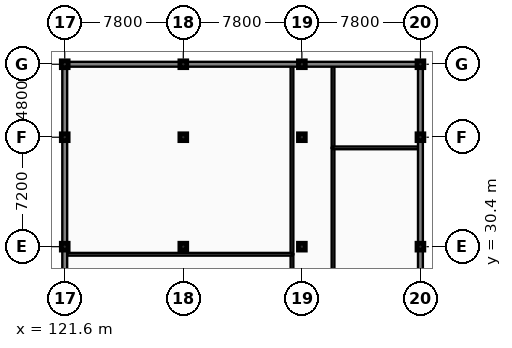
"""IFC4 building model, lengths in metres.
Left out: names, types, materials, properties, quantities, classifications, styles, units other than length and angle.
Written with IfcOpenShell. Run it as: python <this file> out.ifc"""

import sys

from ifc_helpers import new_model, si_unit, direction, frame, frame_2d, origin, origin_2d, place, context, subcontext, project, spatial, rectangle, extrude, element, fill, save


model = new_model("IFC4")
c1 = context("Model", 3, precision=1e-05, world=origin(), true_north=direction((0.0, 1.0)))
c2 = subcontext(c1, "Body", "Model", "MODEL_VIEW")
j1 = project(units=[si_unit("LENGTHUNIT", "METRE"), si_unit("PLANEANGLEUNIT", "RADIAN")], contexts=[c1])
p1 = place(None, origin())
s1 = spatial("IfcSite", under=j1, at=p1, CompositionType="ELEMENT")
p2 = place(p1, origin())
s2 = spatial("IfcBuilding", under=s1, at=p2, CompositionType="ELEMENT")
p3 = place(p2, origin())
s3 = spatial("IfcBuildingStorey", under=s2, at=p3, CompositionType="ELEMENT", Elevation=0.0)
for number, where, z_axis, x_axis in (
    (1, (121.6, 30.4, 0.0), (0.0, 0.0, 1.0), (1.0, 0.0, 0.0)),
    (2, (121.6, 37.6, 0.0), (0.0, 0.0, 1.0), (1.0, 0.0, 0.0)),
    (3, (121.6, 42.4, 0.0), (0.0, 0.0, 1.0), (1.0, 0.0, 0.0)),
    (4, (129.4, 30.4, 0.0), (0.0, 0.0, 1.0), (1.0, 0.0, 0.0)),
    (5, (129.4, 37.6, 0.0), (0.0, 0.0, 1.0), (1.0, 0.0, 0.0)),
    (6, (129.4, 42.4, 0.0), (0.0, 0.0, 1.0), (1.0, 0.0, 0.0)),
    (7, (137.2, 30.4, 0.0), (0.0, 0.0, 1.0), (1.0, 0.0, 0.0)),
    (8, (137.2, 37.6, 0.0), (0.0, 0.0, 1.0), (1.0, 0.0, 0.0)),
    (9, (137.2, 42.4, 0.0), (0.0, 0.0, 1.0), (1.0, 0.0, 0.0)),
    (10, (145.0, 30.4, 0.0), (0.0, 0.0, 1.0), (1.0, 0.0, 0.0)),
    (11, (145.0, 37.6, 0.0), (0.0, 0.0, 1.0), (1.0, 0.0, 0.0)),
    (12, (145.0, 42.4, 0.0), (0.0, 0.0, 1.0), (1.0, 0.0, 0.0)),
):
    element("IfcColumn", number, at=place(p3, frame(where, z_axis=z_axis, x_axis=x_axis)), inside=s3, PredefinedType="COLUMN", context=c2, shape_type="SweptSolid", body=[
        extrude(rectangle(XDim=0.45, YDim=0.45, at=origin_2d()), origin(), (0.0, 0.0, 1.0), 5.4),
    ])
p4 = place(p3, frame((136.55, 16.65, 0.0), z_axis=(0.0, 0.0, 1.0), x_axis=(0.0, 1.0, 0.0)))
e13 = element("IfcWall", 13, at=p4, inside=s3, PredefinedType="PARTITIONING", context=c2, shape_type="SweptSolid", body=[
    extrude(rectangle(XDim=13.25, YDim=0.18, at=frame_2d((6.625, 0.0))), origin(), (0.0, 0.0, 1.0), 4.64),
])
p5 = place(p4, frame((3.92, 0.0, -0.01)))
e14 = element("IfcOpeningElement", 14, at=p5, cuts=e13, PredefinedType="OPENING", context=c2, shape_type="SweptSolid", body=[
    extrude(rectangle(XDim=1.0, YDim=2.16, at=frame_2d((0.5, 1.08))), frame((0.0, 0.1, 0.0), z_axis=(0.0, -1.0, 0.0), x_axis=(1.0, 0.0, 0.0)), (0.0, 0.0, 1.0), 0.2),
])
p6 = place(p3, frame((136.55, 29.9, 0.0), z_axis=(0.0, 0.0, 1.0), x_axis=(0.0, 1.0, 0.0)))
e15 = element("IfcWall", 15, at=p6, inside=s3, PredefinedType="PARTITIONING", context=c2, shape_type="SweptSolid", body=[
    extrude(rectangle(XDim=12.35, YDim=0.18, at=frame_2d((6.175, 0.0))), origin(), (0.0, 0.0, 1.0), 4.54),
])
p7 = place(p6, frame((5.675, 0.0, -0.01)))
e16 = element("IfcOpeningElement", 16, at=p7, cuts=e15, PredefinedType="OPENING", context=c2, shape_type="SweptSolid", body=[
    extrude(rectangle(XDim=1.0, YDim=2.16, at=frame_2d((0.5, 1.08))), frame((0.0, 0.1, 0.0), z_axis=(0.0, -1.0, 0.0), x_axis=(1.0, 0.0, 0.0)), (0.0, 0.0, 1.0), 0.2),
])
p8 = place(p3, frame((121.75, 29.9, 0.0), z_axis=(0.0, 0.0, 1.0), x_axis=(1.0, 0.0, 0.0)))
e17 = element("IfcWall", 17, at=p8, inside=s3, PredefinedType="PARTITIONING", context=c2, shape_type="SweptSolid", body=[
    extrude(rectangle(XDim=14.8, YDim=0.18, at=frame_2d((7.4, 0.0))), origin(), (0.0, 0.0, 1.0), 4.64),
])
p9 = place(p3, frame((139.25, 23.1, 0.0), z_axis=(0.0, 0.0, 1.0), x_axis=(0.0, 1.0, 0.0)))
e18 = element("IfcWall", 18, at=p9, inside=s3, PredefinedType="PARTITIONING", context=c2, shape_type="SweptSolid", body=[
    extrude(rectangle(XDim=13.8, YDim=0.18, at=frame_2d((6.9, 0.0))), origin(), (0.0, 0.0, 1.0), 4.54),
])
p10 = place(p9, frame((6.4, 0.0, -0.01)))
e19 = element("IfcOpeningElement", 19, at=p10, cuts=e18, PredefinedType="OPENING", context=c2, shape_type="SweptSolid", body=[
    extrude(rectangle(XDim=1.0, YDim=2.16, at=frame_2d((0.5, 1.08))), frame((0.0, 0.1, 0.0), z_axis=(0.0, -1.0, 0.0), x_axis=(1.0, 0.0, 0.0)), (0.0, 0.0, 1.0), 0.2),
])
p11 = place(p3, frame((139.25, 36.9, 0.0), z_axis=(0.0, 0.0, 1.0), x_axis=(0.0, 1.0, 0.0)))
e20 = element("IfcWall", 20, at=p11, inside=s3, PredefinedType="PARTITIONING", context=c2, shape_type="SweptSolid", body=[
    extrude(rectangle(XDim=5.35, YDim=0.18, at=frame_2d((2.675, 0.0))), origin(), (0.0, 0.0, 1.0), 4.54),
])
p12 = place(p11, frame((2.175, 0.0, -0.01)))
e21 = element("IfcOpeningElement", 21, at=p12, cuts=e20, PredefinedType="OPENING", context=c2, shape_type="SweptSolid", body=[
    extrude(rectangle(XDim=1.0, YDim=2.16, at=frame_2d((0.5, 1.08))), frame((0.0, 0.1, 0.0), z_axis=(0.0, -1.0, 0.0), x_axis=(1.0, 0.0, 0.0)), (0.0, 0.0, 1.0), 0.2),
])
p13 = place(p3, frame((139.25, 36.9, 0.0), z_axis=(0.0, 0.0, 1.0), x_axis=(1.0, 0.0, 0.0)))
e22 = element("IfcWall", 22, at=p13, inside=s3, PredefinedType="PARTITIONING", context=c2, shape_type="SweptSolid", body=[
    extrude(rectangle(XDim=5.6, YDim=0.18, at=frame_2d((2.8, 0.0))), origin(), (0.0, 0.0, 1.0), 4.64),
])
p14 = place(p3, frame((129.4, 42.4, 0.0), z_axis=(0.0, 0.0, 1.0), x_axis=(-1.0, 0.0, 0.0)))
e23 = element("IfcWall", 23, at=p14, inside=s3, PredefinedType="SOLIDWALL", context=c2, shape_type="SweptSolid", body=[
    extrude(rectangle(XDim=7.8, YDim=0.32, at=frame_2d((3.9, 0.0))), origin(), (0.0, 0.0, 1.0), 4.64),
])
p15 = place(p14, frame((0.46, 0.0, 0.9)))
e24 = element("IfcOpeningElement", 24, at=p15, cuts=e23, PredefinedType="OPENING", context=c2, shape_type="SweptSolid", body=[
    extrude(rectangle(XDim=2.4, YDim=2.35, at=frame_2d((1.2, 1.175))), frame((0.0, 0.17, 0.0), z_axis=(0.0, -1.0, 0.0), x_axis=(1.0, 0.0, 0.0)), (0.0, 0.0, 1.0), 0.34),
])
p16 = place(p14, frame((4.86, 0.0, 0.9)))
e25 = element("IfcOpeningElement", 25, at=p16, cuts=e23, PredefinedType="OPENING", context=c2, shape_type="SweptSolid", body=[
    extrude(rectangle(XDim=2.4, YDim=2.35, at=frame_2d((1.2, 1.175))), frame((0.0, 0.17, 0.0), z_axis=(0.0, -1.0, 0.0), x_axis=(1.0, 0.0, 0.0)), (0.0, 0.0, 1.0), 0.34),
])
p17 = place(p3, frame((137.2, 42.4, 0.0), z_axis=(0.0, 0.0, 1.0), x_axis=(-1.0, 0.0, 0.0)))
e26 = element("IfcWall", 26, at=p17, inside=s3, PredefinedType="SOLIDWALL", context=c2, shape_type="SweptSolid", body=[
    extrude(rectangle(XDim=7.8, YDim=0.32, at=frame_2d((3.9, 0.0))), origin(), (0.0, 0.0, 1.0), 4.64),
])
p18 = place(p17, frame((0.86, 0.0, 0.9)))
e27 = element("IfcOpeningElement", 27, at=p18, cuts=e26, PredefinedType="OPENING", context=c2, shape_type="SweptSolid", body=[
    extrude(rectangle(XDim=2.4, YDim=2.35, at=frame_2d((1.2, 1.175))), frame((0.0, 0.17, 0.0), z_axis=(0.0, -1.0, 0.0), x_axis=(1.0, 0.0, 0.0)), (0.0, 0.0, 1.0), 0.34),
])
p19 = place(p17, frame((4.86, 0.0, 0.9)))
e28 = element("IfcOpeningElement", 28, at=p19, cuts=e26, PredefinedType="OPENING", context=c2, shape_type="SweptSolid", body=[
    extrude(rectangle(XDim=2.4, YDim=2.35, at=frame_2d((1.2, 1.175))), frame((0.0, 0.17, 0.0), z_axis=(0.0, -1.0, 0.0), x_axis=(1.0, 0.0, 0.0)), (0.0, 0.0, 1.0), 0.34),
])
p20 = place(p3, frame((145.0, 42.4, 0.0), z_axis=(0.0, 0.0, 1.0), x_axis=(-1.0, 0.0, 0.0)))
e29 = element("IfcWall", 29, at=p20, inside=s3, PredefinedType="SOLIDWALL", context=c2, shape_type="SweptSolid", body=[
    extrude(rectangle(XDim=7.8, YDim=0.32, at=frame_2d((3.9, 0.0))), origin(), (0.0, 0.0, 1.0), 4.64),
])
p21 = place(p20, frame((1.86, 0.0, 0.9)))
e30 = element("IfcOpeningElement", 30, at=p21, cuts=e29, PredefinedType="OPENING", context=c2, shape_type="SweptSolid", body=[
    extrude(rectangle(XDim=2.4, YDim=2.35, at=frame_2d((1.2, 1.175))), frame((0.0, 0.17, 0.0), z_axis=(0.0, -1.0, 0.0), x_axis=(1.0, 0.0, 0.0)), (0.0, 0.0, 1.0), 0.34),
])
p22 = place(p3, frame((121.6, 30.4, 0.0), z_axis=(0.0, 0.0, 1.0), x_axis=(0.0, -1.0, 0.0)))
e31 = element("IfcWall", 31, at=p22, inside=s3, PredefinedType="SOLIDWALL", context=c2, shape_type="SweptSolid", body=[
    extrude(rectangle(XDim=7.2, YDim=0.32, at=frame_2d((3.6, 0.0))), origin(), (0.0, 0.0, 1.0), 3.99),
])
p23 = place(p22, frame((2.6, 0.0, -0.01)))
e32 = element("IfcOpeningElement", 32, at=p23, cuts=e31, PredefinedType="OPENING", context=c2, shape_type="SweptSolid", body=[
    extrude(rectangle(XDim=2.0, YDim=2.41, at=frame_2d((1.0, 1.205))), frame((0.0, 0.17, 0.0), z_axis=(0.0, -1.0, 0.0), x_axis=(1.0, 0.0, 0.0)), (0.0, 0.0, 1.0), 0.34),
])
p24 = place(p3, frame((121.6, 37.6, 0.0), z_axis=(0.0, 0.0, 1.0), x_axis=(0.0, -1.0, 0.0)))
e33 = element("IfcWall", 33, at=p24, inside=s3, PredefinedType="SOLIDWALL", context=c2, shape_type="SweptSolid", body=[
    extrude(rectangle(XDim=7.2, YDim=0.32, at=frame_2d((3.6, 0.0))), origin(), (0.0, 0.0, 1.0), 4.54),
])
p25 = place(p24, frame((0.46, 0.0, 0.9)))
e34 = element("IfcOpeningElement", 34, at=p25, cuts=e33, PredefinedType="OPENING", context=c2, shape_type="SweptSolid", body=[
    extrude(rectangle(XDim=1.8, YDim=2.2, at=frame_2d((0.9, 1.1))), frame((0.0, 0.17, 0.0), z_axis=(0.0, -1.0, 0.0), x_axis=(1.0, 0.0, 0.0)), (0.0, 0.0, 1.0), 0.34),
])
p26 = place(p24, frame((4.86, 0.0, 0.9)))
e35 = element("IfcOpeningElement", 35, at=p26, cuts=e33, PredefinedType="OPENING", context=c2, shape_type="SweptSolid", body=[
    extrude(rectangle(XDim=1.8, YDim=2.2, at=frame_2d((0.9, 1.1))), frame((0.0, 0.17, 0.0), z_axis=(0.0, -1.0, 0.0), x_axis=(1.0, 0.0, 0.0)), (0.0, 0.0, 1.0), 0.34),
])
p27 = place(p3, frame((121.6, 42.4, 0.0), z_axis=(0.0, 0.0, 1.0), x_axis=(0.0, -1.0, 0.0)))
e36 = element("IfcWall", 36, at=p27, inside=s3, PredefinedType="SOLIDWALL", context=c2, shape_type="SweptSolid", body=[
    extrude(rectangle(XDim=4.8, YDim=0.32, at=frame_2d((2.4, 0.0))), origin(), (0.0, 0.0, 1.0), 4.54),
])
p28 = place(p27, frame((1.46, 0.0, 0.9)))
e37 = element("IfcOpeningElement", 37, at=p28, cuts=e36, PredefinedType="OPENING", context=c2, shape_type="SweptSolid", body=[
    extrude(rectangle(XDim=1.8, YDim=2.2, at=frame_2d((0.9, 1.1))), frame((0.0, 0.17, 0.0), z_axis=(0.0, -1.0, 0.0), x_axis=(1.0, 0.0, 0.0)), (0.0, 0.0, 1.0), 0.34),
])
p29 = place(p3, frame((145.0, 23.2, 0.0), z_axis=(0.0, 0.0, 1.0), x_axis=(0.0, 1.0, 0.0)))
e38 = element("IfcWall", 38, at=p29, inside=s3, PredefinedType="SOLIDWALL", context=c2, shape_type="SweptSolid", body=[
    extrude(rectangle(XDim=7.2, YDim=0.32, at=frame_2d((3.6, 0.0))), origin(), (0.0, 0.0, 1.0), 4.54),
])
p30 = place(p29, frame((0.46, 0.0, 0.9)))
e39 = element("IfcOpeningElement", 39, at=p30, cuts=e38, PredefinedType="OPENING", context=c2, shape_type="SweptSolid", body=[
    extrude(rectangle(XDim=1.8, YDim=2.2, at=frame_2d((0.9, 1.1))), frame((0.0, 0.17, 0.0), z_axis=(0.0, -1.0, 0.0), x_axis=(1.0, 0.0, 0.0)), (0.0, 0.0, 1.0), 0.34),
])
p31 = place(p29, frame((4.86, 0.0, 0.9)))
e40 = element("IfcOpeningElement", 40, at=p31, cuts=e38, PredefinedType="OPENING", context=c2, shape_type="SweptSolid", body=[
    extrude(rectangle(XDim=1.8, YDim=2.2, at=frame_2d((0.9, 1.1))), frame((0.0, 0.17, 0.0), z_axis=(0.0, -1.0, 0.0), x_axis=(1.0, 0.0, 0.0)), (0.0, 0.0, 1.0), 0.34),
])
p32 = place(p3, frame((145.0, 30.4, 0.0), z_axis=(0.0, 0.0, 1.0), x_axis=(0.0, 1.0, 0.0)))
e41 = element("IfcWall", 41, at=p32, inside=s3, PredefinedType="SOLIDWALL", context=c2, shape_type="SweptSolid", body=[
    extrude(rectangle(XDim=7.2, YDim=0.32, at=frame_2d((3.6, 0.0))), origin(), (0.0, 0.0, 1.0), 4.54),
])
p33 = place(p32, frame((0.46, 0.0, 0.9)))
e42 = element("IfcOpeningElement", 42, at=p33, cuts=e41, PredefinedType="OPENING", context=c2, shape_type="SweptSolid", body=[
    extrude(rectangle(XDim=1.8, YDim=2.2, at=frame_2d((0.9, 1.1))), frame((0.0, 0.17, 0.0), z_axis=(0.0, -1.0, 0.0), x_axis=(1.0, 0.0, 0.0)), (0.0, 0.0, 1.0), 0.34),
])
p34 = place(p32, frame((4.46, 0.0, 0.9)))
e43 = element("IfcOpeningElement", 43, at=p34, cuts=e41, PredefinedType="OPENING", context=c2, shape_type="SweptSolid", body=[
    extrude(rectangle(XDim=1.8, YDim=2.2, at=frame_2d((0.9, 1.1))), frame((0.0, 0.17, 0.0), z_axis=(0.0, -1.0, 0.0), x_axis=(1.0, 0.0, 0.0)), (0.0, 0.0, 1.0), 0.34),
])
p35 = place(p3, frame((145.0, 37.6, 0.0), z_axis=(0.0, 0.0, 1.0), x_axis=(0.0, 1.0, 0.0)))
e44 = element("IfcWall", 44, at=p35, inside=s3, PredefinedType="SOLIDWALL", context=c2, shape_type="SweptSolid", body=[
    extrude(rectangle(XDim=4.8, YDim=0.32, at=frame_2d((2.4, 0.0))), origin(), (0.0, 0.0, 1.0), 4.54),
])
p36 = place(p35, frame((1.46, 0.0, 0.9)))
e45 = element("IfcOpeningElement", 45, at=p36, cuts=e44, PredefinedType="OPENING", context=c2, shape_type="SweptSolid", body=[
    extrude(rectangle(XDim=1.8, YDim=2.2, at=frame_2d((0.9, 1.1))), frame((0.0, 0.17, 0.0), z_axis=(0.0, -1.0, 0.0), x_axis=(1.0, 0.0, 0.0)), (0.0, 0.0, 1.0), 0.34),
])
p37 = place(p7, frame((0.0, 0.0, 0.01)))
e46 = element("IfcDoor", 46, at=p37, inside=s3, OperationType="SINGLE_SWING_RIGHT", PredefinedType="DOOR", context=c2, shape_type="SweptSolid", body=[
    extrude(rectangle(XDim=1.0, YDim=2.15, at=frame_2d((0.5, 1.075))), frame((0.0, 0.025, 0.0), z_axis=(0.0, -1.0, 0.0), x_axis=(1.0, 0.0, 0.0)), (0.0, 0.0, 1.0), 0.05),
])
fill(e16, e46)
p38 = place(p10, frame((0.0, 0.0, 0.01)))
e47 = element("IfcDoor", 47, at=p38, inside=s3, OperationType="SINGLE_SWING_RIGHT", PredefinedType="DOOR", context=c2, shape_type="SweptSolid", body=[
    extrude(rectangle(XDim=1.0, YDim=2.15, at=frame_2d((0.5, 1.075))), frame((0.0, 0.025, 0.0), z_axis=(0.0, -1.0, 0.0), x_axis=(1.0, 0.0, 0.0)), (0.0, 0.0, 1.0), 0.05),
])
fill(e19, e47)
p39 = place(p12, frame((0.0, 0.0, 0.01)))
e48 = element("IfcDoor", 48, at=p39, inside=s3, OperationType="SINGLE_SWING_LEFT", PredefinedType="DOOR", context=c2, shape_type="SweptSolid", body=[
    extrude(rectangle(XDim=1.0, YDim=2.15, at=frame_2d((0.5, 1.075))), frame((0.0, 0.025, 0.0), z_axis=(0.0, -1.0, 0.0), x_axis=(1.0, 0.0, 0.0)), (0.0, 0.0, 1.0), 0.05),
])
fill(e21, e48)
p40 = place(p15, origin())
e49 = element("IfcWindow", 49, at=p40, inside=s3, PartitioningType="TRIPLE_PANEL_VERTICAL", PredefinedType="WINDOW", context=c2, shape_type="SweptSolid", body=[
    extrude(rectangle(XDim=2.4, YDim=2.35, at=frame_2d((1.2, 1.175))), frame((0.0, 0.03, 0.0), z_axis=(0.0, -1.0, 0.0), x_axis=(1.0, 0.0, 0.0)), (0.0, 0.0, 1.0), 0.06),
])
fill(e24, e49)
p41 = place(p16, origin())
e50 = element("IfcWindow", 50, at=p41, inside=s3, PartitioningType="TRIPLE_PANEL_VERTICAL", PredefinedType="WINDOW", context=c2, shape_type="SweptSolid", body=[
    extrude(rectangle(XDim=2.4, YDim=2.35, at=frame_2d((1.2, 1.175))), frame((0.0, 0.03, 0.0), z_axis=(0.0, -1.0, 0.0), x_axis=(1.0, 0.0, 0.0)), (0.0, 0.0, 1.0), 0.06),
])
fill(e25, e50)
p42 = place(p18, origin())
e51 = element("IfcWindow", 51, at=p42, inside=s3, PartitioningType="TRIPLE_PANEL_VERTICAL", PredefinedType="WINDOW", context=c2, shape_type="SweptSolid", body=[
    extrude(rectangle(XDim=2.4, YDim=2.35, at=frame_2d((1.2, 1.175))), frame((0.0, 0.03, 0.0), z_axis=(0.0, -1.0, 0.0), x_axis=(1.0, 0.0, 0.0)), (0.0, 0.0, 1.0), 0.06),
])
fill(e27, e51)
p43 = place(p19, origin())
e52 = element("IfcWindow", 52, at=p43, inside=s3, PartitioningType="TRIPLE_PANEL_VERTICAL", PredefinedType="WINDOW", context=c2, shape_type="SweptSolid", body=[
    extrude(rectangle(XDim=2.4, YDim=2.35, at=frame_2d((1.2, 1.175))), frame((0.0, 0.03, 0.0), z_axis=(0.0, -1.0, 0.0), x_axis=(1.0, 0.0, 0.0)), (0.0, 0.0, 1.0), 0.06),
])
fill(e28, e52)
p44 = place(p21, origin())
e53 = element("IfcWindow", 53, at=p44, inside=s3, PartitioningType="TRIPLE_PANEL_VERTICAL", PredefinedType="WINDOW", context=c2, shape_type="SweptSolid", body=[
    extrude(rectangle(XDim=2.4, YDim=2.35, at=frame_2d((1.2, 1.175))), frame((0.0, 0.03, 0.0), z_axis=(0.0, -1.0, 0.0), x_axis=(1.0, 0.0, 0.0)), (0.0, 0.0, 1.0), 0.06),
])
fill(e30, e53)
p45 = place(p25, origin())
e54 = element("IfcWindow", 54, at=p45, inside=s3, PartitioningType="DOUBLE_PANEL_VERTICAL", PredefinedType="WINDOW", context=c2, shape_type="SweptSolid", body=[
    extrude(rectangle(XDim=1.8, YDim=2.2, at=frame_2d((0.9, 1.1))), frame((0.0, 0.03, 0.0), z_axis=(0.0, -1.0, 0.0), x_axis=(1.0, 0.0, 0.0)), (0.0, 0.0, 1.0), 0.06),
])
fill(e34, e54)
p46 = place(p26, origin())
e55 = element("IfcWindow", 55, at=p46, inside=s3, PartitioningType="DOUBLE_PANEL_VERTICAL", PredefinedType="WINDOW", context=c2, shape_type="SweptSolid", body=[
    extrude(rectangle(XDim=1.8, YDim=2.2, at=frame_2d((0.9, 1.1))), frame((0.0, 0.03, 0.0), z_axis=(0.0, -1.0, 0.0), x_axis=(1.0, 0.0, 0.0)), (0.0, 0.0, 1.0), 0.06),
])
fill(e35, e55)
p47 = place(p28, origin())
e56 = element("IfcWindow", 56, at=p47, inside=s3, PartitioningType="DOUBLE_PANEL_VERTICAL", PredefinedType="WINDOW", context=c2, shape_type="SweptSolid", body=[
    extrude(rectangle(XDim=1.8, YDim=2.2, at=frame_2d((0.9, 1.1))), frame((0.0, 0.03, 0.0), z_axis=(0.0, -1.0, 0.0), x_axis=(1.0, 0.0, 0.0)), (0.0, 0.0, 1.0), 0.06),
])
fill(e37, e56)
p48 = place(p31, origin())
e57 = element("IfcWindow", 57, at=p48, inside=s3, PartitioningType="DOUBLE_PANEL_VERTICAL", PredefinedType="WINDOW", context=c2, shape_type="SweptSolid", body=[
    extrude(rectangle(XDim=1.8, YDim=2.2, at=frame_2d((0.9, 1.1))), frame((0.0, 0.03, 0.0), z_axis=(0.0, -1.0, 0.0), x_axis=(1.0, 0.0, 0.0)), (0.0, 0.0, 1.0), 0.06),
])
fill(e40, e57)
p49 = place(p33, origin())
e58 = element("IfcWindow", 58, at=p49, inside=s3, PartitioningType="DOUBLE_PANEL_VERTICAL", PredefinedType="WINDOW", context=c2, shape_type="SweptSolid", body=[
    extrude(rectangle(XDim=1.8, YDim=2.2, at=frame_2d((0.9, 1.1))), frame((0.0, 0.03, 0.0), z_axis=(0.0, -1.0, 0.0), x_axis=(1.0, 0.0, 0.0)), (0.0, 0.0, 1.0), 0.06),
])
fill(e42, e58)
p50 = place(p34, origin())
e59 = element("IfcWindow", 59, at=p50, inside=s3, PartitioningType="DOUBLE_PANEL_VERTICAL", PredefinedType="WINDOW", context=c2, shape_type="SweptSolid", body=[
    extrude(rectangle(XDim=1.8, YDim=2.2, at=frame_2d((0.9, 1.1))), frame((0.0, 0.03, 0.0), z_axis=(0.0, -1.0, 0.0), x_axis=(1.0, 0.0, 0.0)), (0.0, 0.0, 1.0), 0.06),
])
fill(e43, e59)
p51 = place(p36, origin())
e60 = element("IfcWindow", 60, at=p51, inside=s3, PartitioningType="DOUBLE_PANEL_VERTICAL", PredefinedType="WINDOW", context=c2, shape_type="SweptSolid", body=[
    extrude(rectangle(XDim=1.8, YDim=2.2, at=frame_2d((0.9, 1.1))), frame((0.0, 0.03, 0.0), z_axis=(0.0, -1.0, 0.0), x_axis=(1.0, 0.0, 0.0)), (0.0, 0.0, 1.0), 0.06),
])
fill(e45, e60)
save(model, sys.argv[1])
